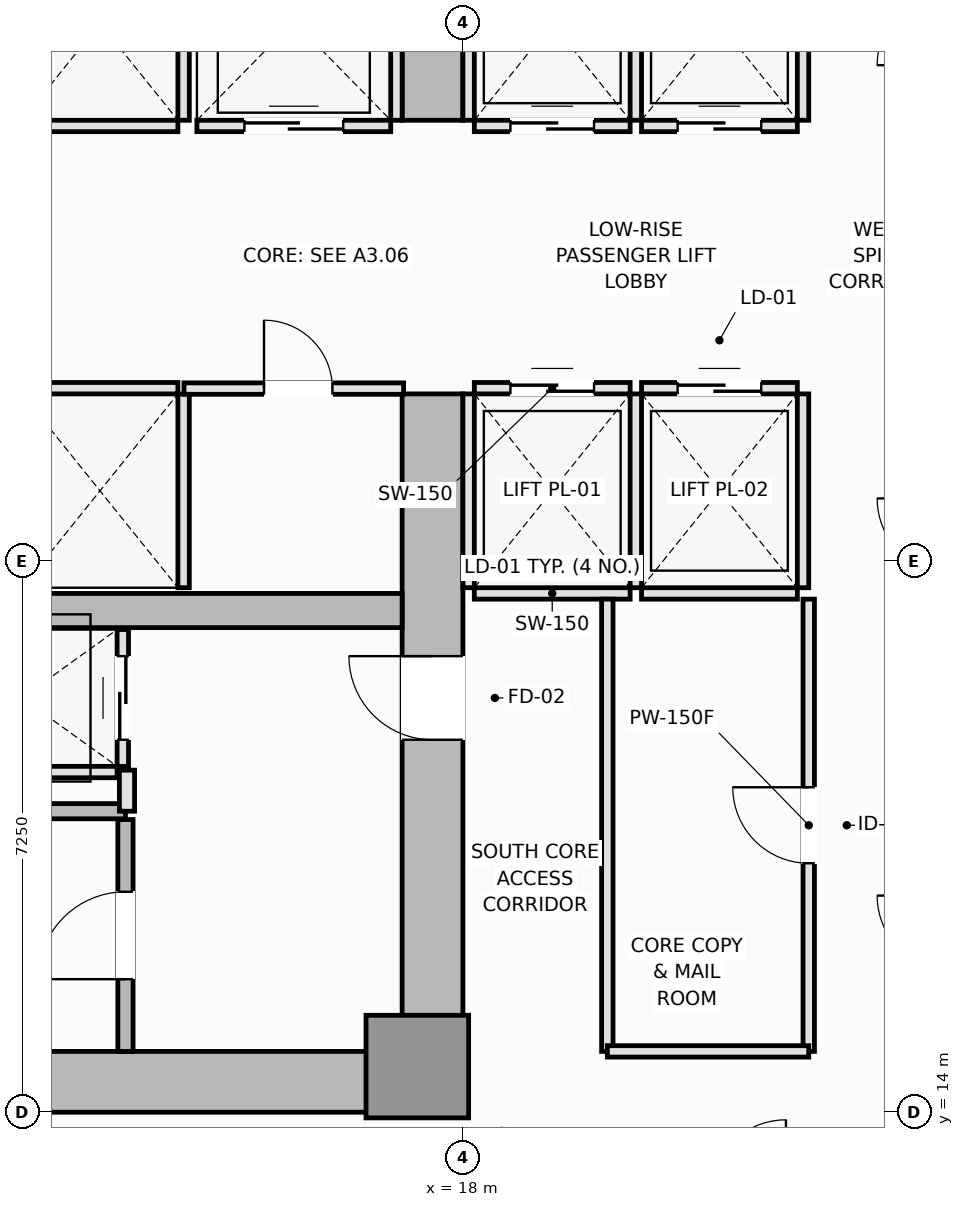
"""IFC4 building model, lengths in metres.
Left out: names, types, materials, properties, quantities, classifications, styles, units other than length and angle.
Written with IfcOpenShell. Run it as: python <this file> out.ifc"""

import sys

from ifc_helpers import new_model, si_unit, direction, frame, frame_2d, origin, origin_2d, place, context, subcontext, project, spatial, rectangle, extrude, element, fill, save


model = new_model("IFC4")
c1 = context("Model", 3, precision=1e-05, world=origin(), true_north=direction((0.0, 1.0)))
c2 = subcontext(c1, "Body", "Model", "MODEL_VIEW")
j1 = project(units=[si_unit("LENGTHUNIT", "METRE"), si_unit("PLANEANGLEUNIT", "RADIAN")], contexts=[c1])
p1 = place(None, origin())
s1 = spatial("IfcSite", under=j1, at=p1, CompositionType="ELEMENT")
p2 = place(p1, origin())
s2 = spatial("IfcBuilding", under=s1, at=p2, CompositionType="ELEMENT")
p3 = place(p2, frame((0.0, 0.0, 82.4)))
s3 = spatial("IfcBuildingStorey", under=s2, at=p3, CompositionType="ELEMENT", Elevation=82.4)
p4 = place(p3, frame((4.5, 14.4, 0.0), z_axis=(0.0, 0.0, 1.0), x_axis=(1.0, 0.0, 0.0)))
e1 = element("IfcWall", 1, at=p4, inside=s3, PredefinedType="SHEAR", context=c2, shape_type="SweptSolid", body=[
    extrude(rectangle(XDim=13.5, YDim=0.8, at=frame_2d((6.75, 0.0))), origin(), (0.0, 0.0, 1.0), 3.55),
])
p5 = place(p3, frame((17.6, 14.8, 0.0), z_axis=(0.0, 0.0, 1.0), x_axis=(0.0, 1.0, 0.0)))
e2 = element("IfcWall", 2, at=p5, inside=s3, PredefinedType="SHEAR", context=c2, shape_type="SweptSolid", body=[
    extrude(rectangle(XDim=8.65, YDim=0.8, at=frame_2d((4.325, 0.0))), origin(), (0.0, 0.0, 1.0), 3.55),
])
p6 = place(p5, frame((4.1, 0.0, 0.0)))
e3 = element("IfcOpeningElement", 3, at=p6, cuts=e2, PredefinedType="OPENING", context=c2, shape_type="SweptSolid", body=[
    extrude(rectangle(XDim=1.1, YDim=2.15, at=frame_2d((0.55, 1.075))), frame((0.0, 0.41, 0.0), z_axis=(0.0, -1.0, 0.0), x_axis=(1.0, 0.0, 0.0)), (0.0, 0.0, 1.0), 0.82),
])
p7 = place(p3, frame((17.6, 27.05, 0.0), z_axis=(0.0, 0.0, 1.0), x_axis=(0.0, 1.0, 0.0)))
e4 = element("IfcWall", 4, at=p7, inside=s3, PredefinedType="SHEAR", context=c2, shape_type="SweptSolid", body=[
    extrude(rectangle(XDim=8.65, YDim=0.8, at=frame_2d((4.325, 0.0))), origin(), (0.0, 0.0, 1.0), 3.55),
])
p8 = place(p7, frame((3.45, 0.0, 0.0)))
e5 = element("IfcOpeningElement", 5, at=p8, cuts=e4, PredefinedType="OPENING", context=c2, shape_type="SweptSolid", body=[
    extrude(rectangle(XDim=1.1, YDim=2.15, at=frame_2d((0.55, 1.075))), frame((0.0, 0.41, 0.0), z_axis=(0.0, -1.0, 0.0), x_axis=(1.0, 0.0, 0.0)), (0.0, 0.0, 1.0), 0.82),
])
p9 = place(p3, frame((5.3, 20.6, 0.0), z_axis=(0.0, 0.0, 1.0), x_axis=(1.0, 0.0, 0.0)))
e6 = element("IfcWall", 6, at=p9, inside=s3, PredefinedType="SHEAR", context=c2, shape_type="SweptSolid", body=[
    extrude(rectangle(XDim=11.9, YDim=0.45, at=frame_2d((5.95, 0.0))), origin(), (0.0, 0.0, 1.0), 3.55),
])
p10 = place(p3, frame((17.4, 14.6, 0.0), z_axis=(0.0, 0.0, 1.0), x_axis=(1.0, 0.0, 0.0)))
e7 = element("IfcColumn", 7, at=p10, inside=s3, PredefinedType="PILASTER", context=c2, shape_type="SweptSolid", body=[
    extrude(rectangle(XDim=1.35, YDim=1.35, at=origin_2d()), origin(), (0.0, 0.0, 1.0), 3.55),
])
p11 = place(p3, frame((5.9, 17.96, 0.0), z_axis=(0.0, 0.0, 1.0), x_axis=(1.0, 0.0, 0.0)))
e8 = element("IfcWall", 8, at=p11, inside=s3, PredefinedType="SOLIDWALL", context=c2, shape_type="SweptSolid", body=[
    extrude(rectangle(XDim=7.66, YDim=0.2, at=frame_2d((3.83, 0.0))), origin(), (0.0, 0.0, 1.0), 3.55),
])
p12 = place(p3, frame((13.56, 14.8, 0.0), z_axis=(0.0, 0.0, 1.0), x_axis=(0.0, 1.0, 0.0)))
e9 = element("IfcWall", 9, at=p12, inside=s3, PredefinedType="SOLIDWALL", context=c2, shape_type="SweptSolid", body=[
    extrude(rectangle(XDim=3.05, YDim=0.2, at=frame_2d((1.525, 0.0))), origin(), (0.0, 0.0, 1.0), 3.55),
])
p13 = place(p12, frame((0.95, 0.0, 0.0)))
e10 = element("IfcOpeningElement", 10, at=p13, cuts=e9, PredefinedType="OPENING", context=c2, shape_type="SweptSolid", body=[
    extrude(rectangle(XDim=1.15, YDim=2.15, at=frame_2d((0.575, 1.075))), frame((0.0, 0.11, 0.0), z_axis=(0.0, -1.0, 0.0), x_axis=(1.0, 0.0, 0.0)), (0.0, 0.0, 1.0), 0.22),
])
p14 = place(p3, frame((18.15, 20.825, 0.0), z_axis=(0.0, 0.0, 1.0), x_axis=(1.0, 0.0, 0.0)))
e11 = element("IfcWall", 11, at=p14, inside=s3, PredefinedType="PARTITIONING", context=c2, shape_type="SweptSolid", body=[
    extrude(rectangle(XDim=2.05, YDim=0.15, at=frame_2d((1.025, 0.0))), origin(), (0.0, 0.0, 1.0), 3.37),
])
p15 = place(p3, frame((18.15, 23.525, 0.0), z_axis=(0.0, 0.0, 1.0), x_axis=(1.0, 0.0, 0.0)))
e12 = element("IfcWall", 12, at=p15, inside=s3, PredefinedType="PARTITIONING", context=c2, shape_type="SweptSolid", body=[
    extrude(rectangle(XDim=2.05, YDim=0.15, at=frame_2d((1.025, 0.0))), origin(), (0.0, 0.0, 1.0), 3.37),
])
p16 = place(p15, frame((0.475, 0.0, 0.0)))
e13 = element("IfcOpeningElement", 13, at=p16, cuts=e12, PredefinedType="OPENING", context=c2, shape_type="SweptSolid", body=[
    extrude(rectangle(XDim=1.1, YDim=2.2, at=frame_2d((0.55, 1.1))), frame((0.0, 0.085, 0.0), z_axis=(0.0, -1.0, 0.0), x_axis=(1.0, 0.0, 0.0)), (0.0, 0.0, 1.0), 0.17),
])
for number, where, z_axis, x_axis in (
    (14, (18.075, 20.9, 0.0), (0.0, 0.0, 1.0), (0.0, 1.0, 0.0)),
    (15, (20.275, 20.9, 0.0), (0.0, 0.0, 1.0), (0.0, 1.0, 0.0)),
):
    element("IfcWall", number, at=place(p3, frame(where, z_axis=z_axis, x_axis=x_axis)), inside=s3, PredefinedType="PARTITIONING", context=c2, shape_type="SweptSolid", body=[
        extrude(rectangle(XDim=2.55, YDim=0.15, at=frame_2d((1.275, 0.0))), origin(), (0.0, 0.0, 1.0), 3.37),
    ])
p17 = place(p3, frame((20.35, 20.825, 0.0), z_axis=(0.0, 0.0, 1.0), x_axis=(1.0, 0.0, 0.0)))
e16 = element("IfcWall", 16, at=p17, inside=s3, PredefinedType="PARTITIONING", context=c2, shape_type="SweptSolid", body=[
    extrude(rectangle(XDim=2.05, YDim=0.15, at=frame_2d((1.025, 0.0))), origin(), (0.0, 0.0, 1.0), 3.37),
])
p18 = place(p3, frame((20.35, 23.525, 0.0), z_axis=(0.0, 0.0, 1.0), x_axis=(1.0, 0.0, 0.0)))
e17 = element("IfcWall", 17, at=p18, inside=s3, PredefinedType="PARTITIONING", context=c2, shape_type="SweptSolid", body=[
    extrude(rectangle(XDim=2.05, YDim=0.15, at=frame_2d((1.025, 0.0))), origin(), (0.0, 0.0, 1.0), 3.37),
])
p19 = place(p18, frame((0.475, 0.0, 0.0)))
e18 = element("IfcOpeningElement", 18, at=p19, cuts=e17, PredefinedType="OPENING", context=c2, shape_type="SweptSolid", body=[
    extrude(rectangle(XDim=1.1, YDim=2.2, at=frame_2d((0.55, 1.1))), frame((0.0, 0.085, 0.0), z_axis=(0.0, -1.0, 0.0), x_axis=(1.0, 0.0, 0.0)), (0.0, 0.0, 1.0), 0.17),
])
p20 = place(p3, frame((22.475, 20.9, 0.0), z_axis=(0.0, 0.0, 1.0), x_axis=(0.0, 1.0, 0.0)))
e19 = element("IfcWall", 19, at=p20, inside=s3, PredefinedType="PARTITIONING", context=c2, shape_type="SweptSolid", body=[
    extrude(rectangle(XDim=2.55, YDim=0.15, at=frame_2d((1.275, 0.0))), origin(), (0.0, 0.0, 1.0), 3.37),
])
p21 = place(p3, frame((18.15, 26.975, 0.0), z_axis=(0.0, 0.0, 1.0), x_axis=(1.0, 0.0, 0.0)))
e20 = element("IfcWall", 20, at=p21, inside=s3, PredefinedType="PARTITIONING", context=c2, shape_type="SweptSolid", body=[
    extrude(rectangle(XDim=2.05, YDim=0.15, at=frame_2d((1.025, 0.0))), origin(), (0.0, 0.0, 1.0), 3.37),
])
p22 = place(p21, frame((0.475, 0.0, 0.0)))
e21 = element("IfcOpeningElement", 21, at=p22, cuts=e20, PredefinedType="OPENING", context=c2, shape_type="SweptSolid", body=[
    extrude(rectangle(XDim=1.1, YDim=2.2, at=frame_2d((0.55, 1.1))), frame((0.0, 0.085, 0.0), z_axis=(0.0, -1.0, 0.0), x_axis=(1.0, 0.0, 0.0)), (0.0, 0.0, 1.0), 0.17),
])
for number, where, z_axis, x_axis in (
    (22, (18.075, 27.05, 0.0), (0.0, 0.0, 1.0), (0.0, 1.0, 0.0)),
    (23, (20.275, 27.05, 0.0), (0.0, 0.0, 1.0), (0.0, 1.0, 0.0)),
):
    element("IfcWall", number, at=place(p3, frame(where, z_axis=z_axis, x_axis=x_axis)), inside=s3, PredefinedType="PARTITIONING", context=c2, shape_type="SweptSolid", body=[
        extrude(rectangle(XDim=2.55, YDim=0.15, at=frame_2d((1.275, 0.0))), origin(), (0.0, 0.0, 1.0), 3.37),
    ])
p23 = place(p3, frame((20.35, 26.975, 0.0), z_axis=(0.0, 0.0, 1.0), x_axis=(1.0, 0.0, 0.0)))
e24 = element("IfcWall", 24, at=p23, inside=s3, PredefinedType="PARTITIONING", context=c2, shape_type="SweptSolid", body=[
    extrude(rectangle(XDim=2.05, YDim=0.15, at=frame_2d((1.025, 0.0))), origin(), (0.0, 0.0, 1.0), 3.37),
])
p24 = place(p23, frame((0.475, 0.0, 0.0)))
e25 = element("IfcOpeningElement", 25, at=p24, cuts=e24, PredefinedType="OPENING", context=c2, shape_type="SweptSolid", body=[
    extrude(rectangle(XDim=1.1, YDim=2.2, at=frame_2d((0.55, 1.1))), frame((0.0, 0.085, 0.0), z_axis=(0.0, -1.0, 0.0), x_axis=(1.0, 0.0, 0.0)), (0.0, 0.0, 1.0), 0.17),
])
p25 = place(p3, frame((22.475, 27.05, 0.0), z_axis=(0.0, 0.0, 1.0), x_axis=(0.0, 1.0, 0.0)))
e26 = element("IfcWall", 26, at=p25, inside=s3, PredefinedType="PARTITIONING", context=c2, shape_type="SweptSolid", body=[
    extrude(rectangle(XDim=2.55, YDim=0.15, at=frame_2d((1.275, 0.0))), origin(), (0.0, 0.0, 1.0), 3.37),
])
p26 = place(p3, frame((12.2, 23.525, 0.0), z_axis=(0.0, 0.0, 1.0), x_axis=(1.0, 0.0, 0.0)))
e27 = element("IfcWall", 27, at=p26, inside=s3, PredefinedType="PARTITIONING", context=c2, shape_type="SweptSolid", body=[
    extrude(rectangle(XDim=2.05, YDim=0.15, at=frame_2d((1.025, 0.0))), origin(), (0.0, 0.0, 1.0), 3.37),
])
p27 = place(p3, frame((14.325, 20.9, 0.0), z_axis=(0.0, 0.0, 1.0), x_axis=(0.0, 1.0, 0.0)))
e28 = element("IfcWall", 28, at=p27, inside=s3, PredefinedType="PARTITIONING", context=c2, shape_type="SweptSolid", body=[
    extrude(rectangle(XDim=2.55, YDim=0.15, at=frame_2d((1.275, 0.0))), origin(), (0.0, 0.0, 1.0), 3.37),
])
p28 = place(p3, frame((12.2, 26.975, 0.0), z_axis=(0.0, 0.0, 1.0), x_axis=(1.0, 0.0, 0.0)))
e29 = element("IfcWall", 29, at=p28, inside=s3, PredefinedType="PARTITIONING", context=c2, shape_type="SweptSolid", body=[
    extrude(rectangle(XDim=2.05, YDim=0.15, at=frame_2d((1.025, 0.0))), origin(), (0.0, 0.0, 1.0), 3.37),
])
p29 = place(p3, frame((14.325, 27.05, 0.0), z_axis=(0.0, 0.0, 1.0), x_axis=(0.0, 1.0, 0.0)))
e30 = element("IfcWall", 30, at=p29, inside=s3, PredefinedType="PARTITIONING", context=c2, shape_type="SweptSolid", body=[
    extrude(rectangle(XDim=2.55, YDim=0.15, at=frame_2d((1.275, 0.0))), origin(), (0.0, 0.0, 1.0), 3.37),
])
p30 = place(p3, frame((14.5, 26.975, 0.0), z_axis=(0.0, 0.0, 1.0), x_axis=(1.0, 0.0, 0.0)))
e31 = element("IfcWall", 31, at=p30, inside=s3, PredefinedType="PARTITIONING", context=c2, shape_type="SweptSolid", body=[
    extrude(rectangle(XDim=2.55, YDim=0.15, at=frame_2d((1.275, 0.0))), origin(), (0.0, 0.0, 1.0), 3.37),
])
p31 = place(p30, frame((0.625, 0.0, 0.0)))
e32 = element("IfcOpeningElement", 32, at=p31, cuts=e31, PredefinedType="OPENING", context=c2, shape_type="SweptSolid", body=[
    extrude(rectangle(XDim=1.3, YDim=2.2, at=frame_2d((0.65, 1.1))), frame((0.0, 0.085, 0.0), z_axis=(0.0, -1.0, 0.0), x_axis=(1.0, 0.0, 0.0)), (0.0, 0.0, 1.0), 0.17),
])
p32 = place(p3, frame((17.125, 27.05, 0.0), z_axis=(0.0, 0.0, 1.0), x_axis=(0.0, 1.0, 0.0)))
e33 = element("IfcWall", 33, at=p32, inside=s3, PredefinedType="PARTITIONING", context=c2, shape_type="SweptSolid", body=[
    extrude(rectangle(XDim=2.6, YDim=0.15, at=frame_2d((1.3, 0.0))), origin(), (0.0, 0.0, 1.0), 3.37),
])
p33 = place(p3, frame((10.95, 18.475, 0.0), z_axis=(0.0, 0.0, 1.0), x_axis=(1.0, 0.0, 0.0)))
e34 = element("IfcWall", 34, at=p33, inside=s3, PredefinedType="PARTITIONING", context=c2, shape_type="SweptSolid", body=[
    extrude(rectangle(XDim=2.5, YDim=0.15, at=frame_2d((1.25, 0.0))), origin(), (0.0, 0.0, 1.0), 3.37),
])
p34 = place(p3, frame((13.525, 18.55, 0.0), z_axis=(0.0, 0.0, 1.0), x_axis=(0.0, 1.0, 0.0)))
e35 = element("IfcWall", 35, at=p34, inside=s3, PredefinedType="PARTITIONING", context=c2, shape_type="SweptSolid", body=[
    extrude(rectangle(XDim=1.8, YDim=0.15, at=frame_2d((0.9, 0.0))), origin(), (0.0, 0.0, 1.0), 3.37),
])
p35 = place(p34, frame((0.35, 0.0, 0.0)))
e36 = element("IfcOpeningElement", 36, at=p35, cuts=e35, PredefinedType="OPENING", context=c2, shape_type="SweptSolid", body=[
    extrude(rectangle(XDim=1.1, YDim=2.2, at=frame_2d((0.55, 1.1))), frame((0.0, 0.085, 0.0), z_axis=(0.0, -1.0, 0.0), x_axis=(1.0, 0.0, 0.0)), (0.0, 0.0, 1.0), 0.17),
])
p36 = place(p3, frame((13.58, 17.96, 0.0), z_axis=(0.0, 0.0, 1.0), x_axis=(0.0, 1.0, 0.0)))
e37 = element("IfcWall", 37, at=p36, inside=s3, PredefinedType="PARTITIONING", context=c2, shape_type="SweptSolid", body=[
    extrude(rectangle(XDim=0.54, YDim=0.2, at=frame_2d((0.27, 0.0))), origin(), (0.0, 0.0, 1.0), 3.37),
])
p37 = place(p3, frame((14.33, 23.52, 0.0), z_axis=(0.0, 0.0, 1.0), x_axis=(1.0, 0.0, 0.0)))
e38 = element("IfcWall", 38, at=p37, inside=s3, PredefinedType="PARTITIONING", context=c2, shape_type="SweptSolid", body=[
    extrude(rectangle(XDim=2.89, YDim=0.15, at=frame_2d((1.445, 0.0))), origin(), (0.0, 0.0, 1.0), 3.37),
])
p38 = place(p37, frame((1.053, 0.0, 0.0)))
e39 = element("IfcOpeningElement", 39, at=p38, cuts=e38, PredefinedType="OPENING", context=c2, shape_type="SweptSolid", body=[
    extrude(rectangle(XDim=0.9, YDim=2.1, at=frame_2d((0.45, 1.05))), frame((0.0, 0.085, 0.0), z_axis=(0.0, -1.0, 0.0), x_axis=(1.0, 0.0, 0.0)), (0.0, 0.0, 1.0), 0.17),
])
p39 = place(p3, frame((22.55, 14.8, 0.0), z_axis=(0.0, 0.0, 1.0), x_axis=(0.0, 1.0, 0.0)))
e40 = element("IfcWall", 40, at=p39, inside=s3, PredefinedType="PARTITIONING", context=c2, shape_type="SweptSolid", body=[
    extrude(rectangle(XDim=5.95, YDim=0.15, at=frame_2d((2.975, 0.0))), origin(), (0.0, 0.0, 1.0), 3.01),
])
p40 = place(p39, frame((2.475, 0.0, 0.0)))
e41 = element("IfcOpeningElement", 41, at=p40, cuts=e40, PredefinedType="OPENING", context=c2, shape_type="SweptSolid", body=[
    extrude(rectangle(XDim=1.0, YDim=2.15, at=frame_2d((0.5, 1.075))), frame((0.0, 0.085, 0.0), z_axis=(0.0, -1.0, 0.0), x_axis=(1.0, 0.0, 0.0)), (0.0, 0.0, 1.0), 0.17),
])
p41 = place(p3, frame((19.9, 14.8, 0.0), z_axis=(0.0, 0.0, 1.0), x_axis=(0.0, 1.0, 0.0)))
e42 = element("IfcWall", 42, at=p41, inside=s3, PredefinedType="PARTITIONING", context=c2, shape_type="SweptSolid", body=[
    extrude(rectangle(XDim=5.95, YDim=0.15, at=frame_2d((2.975, 0.0))), origin(), (0.0, 0.0, 1.0), 3.37),
])
p42 = place(p3, frame((19.9, 14.8, 0.0), z_axis=(0.0, 0.0, 1.0), x_axis=(1.0, 0.0, 0.0)))
e43 = element("IfcWall", 43, at=p42, inside=s3, PredefinedType="PARTITIONING", context=c2, shape_type="SweptSolid", body=[
    extrude(rectangle(XDim=2.65, YDim=0.15, at=frame_2d((1.325, 0.0))), origin(), (0.0, 0.0, 1.0), 3.37),
])
p43 = place(p13, origin())
e44 = element("IfcDoor", 44, at=p43, inside=s3, OperationType="SINGLE_SWING_LEFT", PredefinedType="DOOR", context=c2, shape_type="SweptSolid", body=[
    extrude(rectangle(XDim=1.15, YDim=2.15, at=frame_2d((0.575, 1.075))), frame((0.0, 0.025, 0.0), z_axis=(0.0, -1.0, 0.0), x_axis=(1.0, 0.0, 0.0)), (0.0, 0.0, 1.0), 0.05),
])
fill(e10, e44)
p44 = place(p16, origin())
e45 = element("IfcDoor", 45, at=p44, inside=s3, OperationType="DOUBLE_DOOR_SLIDING", PredefinedType="DOOR", context=c2, shape_type="SweptSolid", body=[
    extrude(rectangle(XDim=1.1, YDim=2.2, at=frame_2d((0.55, 1.1))), frame((0.0, 0.025, 0.0), z_axis=(0.0, -1.0, 0.0), x_axis=(1.0, 0.0, 0.0)), (0.0, 0.0, 1.0), 0.05),
])
fill(e13, e45)
p45 = place(p19, origin())
e46 = element("IfcDoor", 46, at=p45, inside=s3, OperationType="DOUBLE_DOOR_SLIDING", PredefinedType="DOOR", context=c2, shape_type="SweptSolid", body=[
    extrude(rectangle(XDim=1.1, YDim=2.2, at=frame_2d((0.55, 1.1))), frame((0.0, 0.025, 0.0), z_axis=(0.0, -1.0, 0.0), x_axis=(1.0, 0.0, 0.0)), (0.0, 0.0, 1.0), 0.05),
])
fill(e18, e46)
p46 = place(p22, origin())
e47 = element("IfcDoor", 47, at=p46, inside=s3, OperationType="DOUBLE_DOOR_SLIDING", PredefinedType="DOOR", context=c2, shape_type="SweptSolid", body=[
    extrude(rectangle(XDim=1.1, YDim=2.2, at=frame_2d((0.55, 1.1))), frame((0.0, 0.025, 0.0), z_axis=(0.0, -1.0, 0.0), x_axis=(1.0, 0.0, 0.0)), (0.0, 0.0, 1.0), 0.05),
])
fill(e21, e47)
p47 = place(p24, origin())
e48 = element("IfcDoor", 48, at=p47, inside=s3, OperationType="DOUBLE_DOOR_SLIDING", PredefinedType="DOOR", context=c2, shape_type="SweptSolid", body=[
    extrude(rectangle(XDim=1.1, YDim=2.2, at=frame_2d((0.55, 1.1))), frame((0.0, 0.025, 0.0), z_axis=(0.0, -1.0, 0.0), x_axis=(1.0, 0.0, 0.0)), (0.0, 0.0, 1.0), 0.05),
])
fill(e25, e48)
p48 = place(p31, origin())
e49 = element("IfcDoor", 49, at=p48, inside=s3, OperationType="DOUBLE_DOOR_SLIDING", PredefinedType="DOOR", context=c2, shape_type="SweptSolid", body=[
    extrude(rectangle(XDim=1.3, YDim=2.2, at=frame_2d((0.65, 1.1))), frame((0.0, 0.025, 0.0), z_axis=(0.0, -1.0, 0.0), x_axis=(1.0, 0.0, 0.0)), (0.0, 0.0, 1.0), 0.05),
])
fill(e32, e49)
p49 = place(p35, origin())
e50 = element("IfcDoor", 50, at=p49, inside=s3, OperationType="DOUBLE_DOOR_SLIDING", PredefinedType="DOOR", context=c2, shape_type="SweptSolid", body=[
    extrude(rectangle(XDim=1.1, YDim=2.2, at=frame_2d((0.55, 1.1))), frame((0.0, 0.025, 0.0), z_axis=(0.0, -1.0, 0.0), x_axis=(1.0, 0.0, 0.0)), (0.0, 0.0, 1.0), 0.05),
])
fill(e36, e50)
p50 = place(p6, origin())
e51 = element("IfcDoor", 51, at=p50, inside=s3, OperationType="SINGLE_SWING_RIGHT", PredefinedType="DOOR", context=c2, shape_type="SweptSolid", body=[
    extrude(rectangle(XDim=1.1, YDim=2.15, at=frame_2d((0.55, 1.075))), frame((0.0, 0.025, 0.0), z_axis=(0.0, -1.0, 0.0), x_axis=(1.0, 0.0, 0.0)), (0.0, 0.0, 1.0), 0.05),
])
fill(e3, e51)
p51 = place(p38, origin())
e52 = element("IfcDoor", 52, at=p51, inside=s3, OperationType="SINGLE_SWING_LEFT", PredefinedType="DOOR", context=c2, shape_type="SweptSolid", body=[
    extrude(rectangle(XDim=0.9, YDim=2.1, at=frame_2d((0.45, 1.05))), frame((0.0, 0.025, 0.0), z_axis=(0.0, -1.0, 0.0), x_axis=(1.0, 0.0, 0.0)), (0.0, 0.0, 1.0), 0.05),
])
fill(e39, e52)
p52 = place(p40, origin())
e53 = element("IfcDoor", 53, at=p52, inside=s3, OperationType="SINGLE_SWING_RIGHT", PredefinedType="DOOR", context=c2, shape_type="SweptSolid", body=[
    extrude(rectangle(XDim=1.0, YDim=2.15, at=frame_2d((0.5, 1.075))), frame((0.0, 0.025, 0.0), z_axis=(0.0, -1.0, 0.0), x_axis=(1.0, 0.0, 0.0)), (0.0, 0.0, 1.0), 0.05),
])
fill(e41, e53)
save(model, sys.argv[1])
